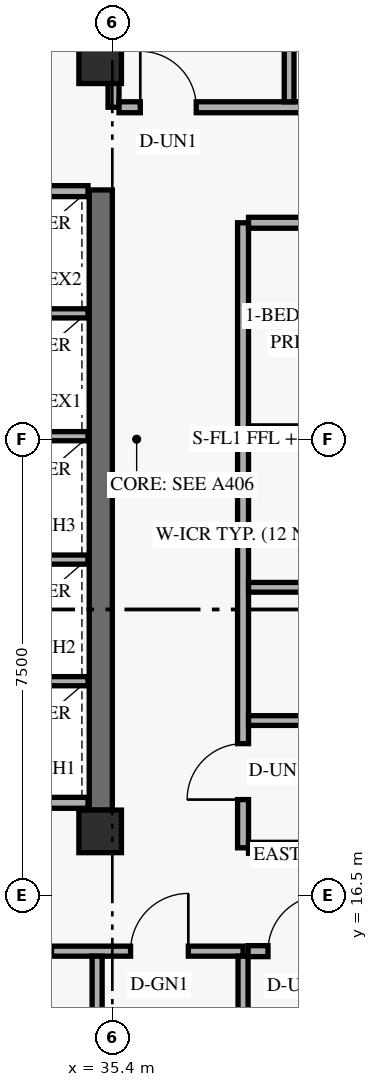
"""IFC4 building model, lengths in metres.
Left out: names, types, materials, properties, quantities, classifications, styles, units other than length and angle.
Written with IfcOpenShell. Run it as: python <this file> out.ifc"""

import sys

from ifc_helpers import new_model, si_unit, direction, frame, frame_2d, origin, origin_2d, place, context, subcontext, project, spatial, rectangle, extrude, element, fill, save


model = new_model("IFC4")
c1 = context("Model", 3, precision=1e-05, world=origin(), true_north=direction((0.0, 1.0)))
c2 = subcontext(c1, "Body", "Model", "MODEL_VIEW")
j1 = project(units=[si_unit("LENGTHUNIT", "METRE"), si_unit("PLANEANGLEUNIT", "RADIAN")], contexts=[c1])
p1 = place(None, origin())
s1 = spatial("IfcSite", under=j1, at=p1, CompositionType="ELEMENT")
p2 = place(p1, origin())
s2 = spatial("IfcBuilding", under=s1, at=p2, CompositionType="ELEMENT")
p3 = place(p2, frame((0.0, 0.0, 162.6)))
s3 = spatial("IfcBuildingStorey", under=s2, at=p3, CompositionType="ELEMENT", Elevation=162.6)
p4 = place(p3, frame((35.21, 17.9, 0.0), z_axis=(0.0, 0.0, 1.0), x_axis=(0.0, 1.0, 0.0)))
e1 = element("IfcWall", 1, at=p4, inside=s3, PredefinedType="SHEAR", context=c2, shape_type="SweptSolid", body=[
    extrude(rectangle(XDim=10.2, YDim=0.38, at=frame_2d((5.1, 0.0))), origin(), (0.0, 0.0, 1.0), 2.748),
])
for number, where, z_axis, x_axis in (
    (2, (35.2, 17.55, 0.0), (0.0, 0.0, 1.0), (1.0, 0.0, 0.0)),
    (3, (35.2, 30.2, 0.0), (0.0, 0.0, 1.0), (1.0, 0.0, 0.0)),
):
    element("IfcColumn", number, at=place(p3, frame(where, z_axis=z_axis, x_axis=x_axis)), inside=s3, PredefinedType="COLUMN", context=c2, shape_type="SweptSolid", body=[
        extrude(rectangle(XDim=0.7, YDim=0.7, at=origin_2d()), origin(), (0.0, 0.0, 1.0), 3.6),
    ])
for number, where, z_axis, x_axis in (
    (4, (32.74, 18.02, 0.0), (0.0, 0.0, 1.0), (1.0, 0.0, 0.0)),
    (5, (32.74, 28.08, 0.0), (0.0, 0.0, 1.0), (1.0, 0.0, 0.0)),
):
    element("IfcWall", number, at=place(p3, frame(where, z_axis=z_axis, x_axis=x_axis)), inside=s3, PredefinedType="STANDARD", context=c2, shape_type="SweptSolid", body=[
        extrude(rectangle(XDim=2.26, YDim=0.18, at=frame_2d((1.13, 0.0))), origin(), (0.0, 0.0, 1.0), 3.36),
    ])
for number, where, z_axis, x_axis in (
    (6, (32.74, 20.02, 0.0), (0.0, 0.0, 1.0), (1.0, 0.0, 0.0)),
    (7, (32.74, 22.02, 0.0), (0.0, 0.0, 1.0), (1.0, 0.0, 0.0)),
    (8, (32.74, 24.05, 0.0), (0.0, 0.0, 1.0), (1.0, 0.0, 0.0)),
    (9, (32.74, 26.07, 0.0), (0.0, 0.0, 1.0), (1.0, 0.0, 0.0)),
):
    element("IfcWall", number, at=place(p3, frame(where, z_axis=z_axis, x_axis=x_axis)), inside=s3, PredefinedType="STANDARD", context=c2, shape_type="SweptSolid", body=[
        extrude(rectangle(XDim=2.26, YDim=0.15, at=frame_2d((1.13, 0.0))), origin(), (0.0, 0.0, 1.0), 3.36),
    ])
p5 = place(p3, frame((32.732, 15.58, 0.0), z_axis=(0.0, 0.0, 1.0), x_axis=(1.0, 0.0, 0.0)))
e10 = element("IfcWall", 10, at=p5, inside=s3, PredefinedType="PARTITIONING", context=c2, shape_type="SweptSolid", body=[
    extrude(rectangle(XDim=4.818, YDim=0.165, at=frame_2d((2.409, 0.0))), origin(), (0.0, 0.0, 1.0), 2.73),
])
p6 = place(p5, frame((0.768, 0.0, 0.0)))
e11 = element("IfcOpeningElement", 11, at=p6, cuts=e10, PredefinedType="OPENING", context=c2, shape_type="SweptSolid", body=[
    extrude(rectangle(XDim=0.9, YDim=2.1, at=frame_2d((0.45, 1.05))), frame((0.0, 0.093, 0.0), z_axis=(0.0, -1.0, 0.0), x_axis=(1.0, 0.0, 0.0)), (0.0, 0.0, 1.0), 0.185),
])
p7 = place(p5, frame((2.968, 0.0, 0.0)))
e12 = element("IfcOpeningElement", 12, at=p7, cuts=e10, PredefinedType="OPENING", context=c2, shape_type="SweptSolid", body=[
    extrude(rectangle(XDim=0.95, YDim=2.15, at=frame_2d((0.475, 1.075))), frame((0.0, 0.093, 0.0), z_axis=(0.0, -1.0, 0.0), x_axis=(1.0, 0.0, 0.0)), (0.0, 0.0, 1.0), 0.185),
])
p8 = place(p3, frame((37.55, 9.25, 0.0), z_axis=(0.0, 0.0, 1.0), x_axis=(0.0, 1.0, 0.0)))
e13 = element("IfcWall", 13, at=p8, inside=s3, PredefinedType="PARTITIONING", context=c2, shape_type="SweptSolid", body=[
    extrude(rectangle(XDim=6.248, YDim=0.165, at=frame_2d((3.124, 0.0))), origin(), (0.0, 0.0, 1.0), 2.73),
])
p9 = place(p3, frame((35.15, 9.5, 0.0), z_axis=(0.0, 0.0, 1.0), x_axis=(0.0, 1.0, 0.0)))
e14 = element("IfcWall", 14, at=p9, inside=s3, PredefinedType="PARTITIONING", context=c2, shape_type="SweptSolid", body=[
    extrude(rectangle(XDim=5.998, YDim=0.165, at=frame_2d((2.999, 0.0))), origin(), (0.0, 0.0, 1.0), 2.73),
])
p10 = place(p3, frame((37.55, 17.28, 0.0), z_axis=(0.0, 0.0, 1.0), x_axis=(0.0, 1.0, 0.0)))
e15 = element("IfcWall", 15, at=p10, inside=s3, PredefinedType="STANDARD", context=c2, shape_type="SweptSolid", body=[
    extrude(rectangle(XDim=10.28, YDim=0.18, at=frame_2d((5.14, 0.0))), origin(), (0.0, 0.0, 1.0), 2.73),
])
p11 = place(p10, frame((0.793, 0.0, 0.0)))
e16 = element("IfcOpeningElement", 16, at=p11, cuts=e15, PredefinedType="OPENING", context=c2, shape_type="SweptSolid", body=[
    extrude(rectangle(XDim=0.92, YDim=2.15, at=frame_2d((0.46, 1.075))), frame((0.0, 0.1, 0.0), z_axis=(0.0, -1.0, 0.0), x_axis=(1.0, 0.0, 0.0)), (0.0, 0.0, 1.0), 0.2),
])
p12 = place(p3, frame((37.633, 15.58, 0.0), z_axis=(0.0, 0.0, 1.0), x_axis=(1.0, 0.0, 0.0)))
e17 = element("IfcWall", 17, at=p12, inside=s3, PredefinedType="STANDARD", context=c2, shape_type="SweptSolid", body=[
    extrude(rectangle(XDim=12.167, YDim=0.18, at=frame_2d((6.084, 0.0))), origin(), (0.0, 0.0, 1.0), 2.73),
])
p13 = place(p12, frame((0.327, 0.0, 0.0)))
e18 = element("IfcOpeningElement", 18, at=p13, cuts=e17, PredefinedType="OPENING", context=c2, shape_type="SweptSolid", body=[
    extrude(rectangle(XDim=0.92, YDim=2.15, at=frame_2d((0.46, 1.075))), frame((0.0, 0.1, 0.0), z_axis=(0.0, -1.0, 0.0), x_axis=(1.0, 0.0, 0.0)), (0.0, 0.0, 1.0), 0.2),
])
p14 = place(p3, frame((37.64, 17.28, 0.0), z_axis=(0.0, 0.0, 1.0), x_axis=(1.0, 0.0, 0.0)))
e19 = element("IfcWall", 19, at=p14, inside=s3, PredefinedType="STANDARD", context=c2, shape_type="SweptSolid", body=[
    extrude(rectangle(XDim=12.16, YDim=0.18, at=frame_2d((6.08, 0.0))), origin(), (0.0, 0.0, 1.0), 2.73),
])
p15 = place(p14, frame((6.475, 0.0, 0.0)))
e20 = element("IfcOpeningElement", 20, at=p15, cuts=e19, PredefinedType="OPENING", context=c2, shape_type="SweptSolid", body=[
    extrude(rectangle(XDim=0.92, YDim=2.15, at=frame_2d((0.46, 1.075))), frame((0.0, 0.1, 0.0), z_axis=(0.0, -1.0, 0.0), x_axis=(1.0, 0.0, 0.0)), (0.0, 0.0, 1.0), 0.2),
])
p16 = place(p3, frame((37.64, 27.56, 0.0), z_axis=(0.0, 0.0, 1.0), x_axis=(1.0, 0.0, 0.0)))
e21 = element("IfcWall", 21, at=p16, inside=s3, PredefinedType="STANDARD", context=c2, shape_type="SweptSolid", body=[
    extrude(rectangle(XDim=12.16, YDim=0.18, at=frame_2d((6.08, 0.0))), origin(), (0.0, 0.0, 1.0), 2.73),
])
p17 = place(p3, frame((35.42, 29.46, 0.0), z_axis=(0.0, 0.0, 1.0), x_axis=(0.0, 1.0, 0.0)))
e22 = element("IfcWall", 22, at=p17, inside=s3, PredefinedType="STANDARD", context=c2, shape_type="SweptSolid", body=[
    extrude(rectangle(XDim=1.89, YDim=0.18, at=frame_2d((0.945, 0.0))), origin(), (0.0, 0.0, 1.0), 2.73),
])
p18 = place(p3, frame((35.51, 29.46, 0.0), z_axis=(0.0, 0.0, 1.0), x_axis=(1.0, 0.0, 0.0)))
e23 = element("IfcWall", 23, at=p18, inside=s3, PredefinedType="STANDARD", context=c2, shape_type="SweptSolid", body=[
    extrude(rectangle(XDim=14.29, YDim=0.18, at=frame_2d((7.145, 0.0))), origin(), (0.0, 0.0, 1.0), 2.73),
])
p19 = place(p18, frame((0.35, 0.0, 0.0)))
e24 = element("IfcOpeningElement", 24, at=p19, cuts=e23, PredefinedType="OPENING", context=c2, shape_type="SweptSolid", body=[
    extrude(rectangle(XDim=0.92, YDim=2.15, at=frame_2d((0.46, 1.075))), frame((0.0, 0.1, 0.0), z_axis=(0.0, -1.0, 0.0), x_axis=(1.0, 0.0, 0.0)), (0.0, 0.0, 1.0), 0.2),
])
p20 = place(p18, frame((7.828, 0.0, 0.0)))
e25 = element("IfcOpeningElement", 25, at=p20, cuts=e23, PredefinedType="OPENING", context=c2, shape_type="SweptSolid", body=[
    extrude(rectangle(XDim=0.92, YDim=2.15, at=frame_2d((0.46, 1.075))), frame((0.0, 0.1, 0.0), z_axis=(0.0, -1.0, 0.0), x_axis=(1.0, 0.0, 0.0)), (0.0, 0.0, 1.0), 0.2),
])
p21 = place(p3, frame((38.308, 29.55, 0.0), z_axis=(0.0, 0.0, 1.0), x_axis=(0.0, 1.0, 0.0)))
e26 = element("IfcWall", 26, at=p21, inside=s3, PredefinedType="PLUMBINGWALL", context=c2, shape_type="SweptSolid", body=[
    extrude(rectangle(XDim=2.43, YDim=0.16, at=frame_2d((1.215, 0.0))), origin(), (0.0, 0.0, 1.0), 2.73),
])
p22 = place(p3, frame((37.64, 24.137, 0.0), z_axis=(0.0, 0.0, 1.0), x_axis=(1.0, 0.0, 0.0)))
e27 = element("IfcWall", 27, at=p22, inside=s3, PredefinedType="PARTITIONING", context=c2, shape_type="SweptSolid", body=[
    extrude(rectangle(XDim=6.425, YDim=0.165, at=frame_2d((3.212, 0.0))), origin(), (0.0, 0.0, 1.0), 3.36),
])
p23 = place(p22, frame((4.004, 0.0, 0.0)))
e28 = element("IfcOpeningElement", 28, at=p23, cuts=e27, PredefinedType="OPENING", context=c2, shape_type="SweptSolid", body=[
    extrude(rectangle(XDim=0.9, YDim=2.14, at=frame_2d((0.45, 1.07))), frame((0.0, 0.093, 0.0), z_axis=(0.0, -1.0, 0.0), x_axis=(1.0, 0.0, 0.0)), (0.0, 0.0, 1.0), 0.185),
])
p24 = place(p3, frame((37.64, 19.373, 0.0), z_axis=(0.0, 0.0, 1.0), x_axis=(1.0, 0.0, 0.0)))
e29 = element("IfcWall", 29, at=p24, inside=s3, PredefinedType="PLUMBINGWALL", context=c2, shape_type="SweptSolid", body=[
    extrude(rectangle(XDim=2.864, YDim=0.16, at=frame_2d((1.432, 0.0))), origin(), (0.0, 0.0, 1.0), 3.36),
])
p25 = place(p3, frame((37.64, 21.564, 0.0), z_axis=(0.0, 0.0, 1.0), x_axis=(1.0, 0.0, 0.0)))
e30 = element("IfcWall", 30, at=p25, inside=s3, PredefinedType="PLUMBINGWALL", context=c2, shape_type="SweptSolid", body=[
    extrude(rectangle(XDim=2.704, YDim=0.16, at=frame_2d((1.352, 0.0))), origin(), (0.0, 0.0, 1.0), 3.36),
])
p26 = place(p7, origin())
e31 = element("IfcDoor", 31, at=p26, inside=s3, OperationType="SINGLE_SWING_RIGHT", PredefinedType="DOOR", context=c2, shape_type="SweptSolid", body=[
    extrude(rectangle(XDim=0.95, YDim=2.15, at=frame_2d((0.475, 1.075))), frame((0.0, 0.025, 0.0), z_axis=(0.0, -1.0, 0.0), x_axis=(1.0, 0.0, 0.0)), (0.0, 0.0, 1.0), 0.05),
])
fill(e12, e31)
p27 = place(p13, origin())
e32 = element("IfcDoor", 32, at=p27, inside=s3, OperationType="SINGLE_SWING_RIGHT", PredefinedType="DOOR", context=c2, shape_type="SweptSolid", body=[
    extrude(rectangle(XDim=0.92, YDim=2.15, at=frame_2d((0.46, 1.075))), frame((0.0, 0.025, 0.0), z_axis=(0.0, -1.0, 0.0), x_axis=(1.0, 0.0, 0.0)), (0.0, 0.0, 1.0), 0.05),
])
fill(e18, e32)
p28 = place(p19, origin())
e33 = element("IfcDoor", 33, at=p28, inside=s3, OperationType="SINGLE_SWING_LEFT", PredefinedType="DOOR", context=c2, shape_type="SweptSolid", body=[
    extrude(rectangle(XDim=0.92, YDim=2.15, at=frame_2d((0.46, 1.075))), frame((0.0, 0.025, 0.0), z_axis=(0.0, -1.0, 0.0), x_axis=(1.0, 0.0, 0.0)), (0.0, 0.0, 1.0), 0.05),
])
fill(e24, e33)
p29 = place(p11, origin())
e34 = element("IfcDoor", 34, at=p29, inside=s3, OperationType="SINGLE_SWING_LEFT", PredefinedType="DOOR", context=c2, shape_type="SweptSolid", body=[
    extrude(rectangle(XDim=0.92, YDim=2.15, at=frame_2d((0.46, 1.075))), frame((0.0, 0.025, 0.0), z_axis=(0.0, -1.0, 0.0), x_axis=(1.0, 0.0, 0.0)), (0.0, 0.0, 1.0), 0.05),
])
fill(e16, e34)
save(model, sys.argv[1])
